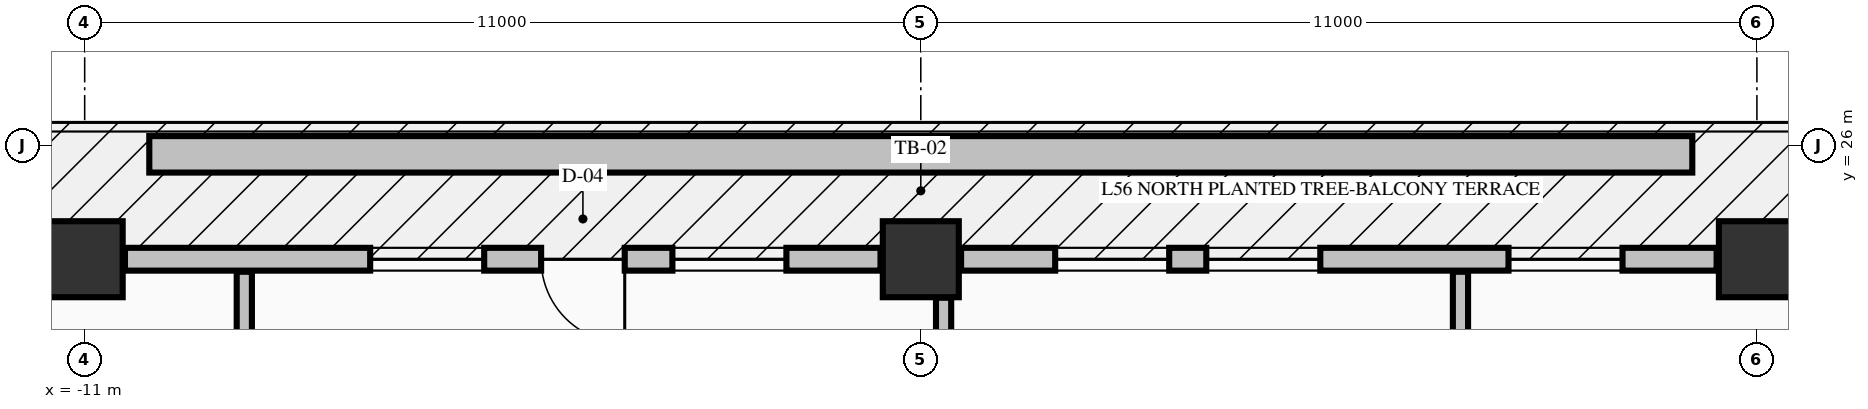
"""IFC4 building model, lengths in metres.
Left out: names, types, materials, properties, quantities, classifications, styles, units other than length and angle.
Written with IfcOpenShell. Run it as: python <this file> out.ifc"""

import sys

from ifc_helpers import new_model, si_unit, direction, frame, frame_2d, origin, origin_2d, place, context, subcontext, project, spatial, rectangle, extrude, element, fill, save


model = new_model("IFC4")
c1 = context("Model", 3, precision=1e-05, world=origin(), true_north=direction((0.0, 1.0)))
c2 = subcontext(c1, "Body", "Model", "MODEL_VIEW")
j1 = project(units=[si_unit("LENGTHUNIT", "METRE"), si_unit("PLANEANGLEUNIT", "RADIAN")], contexts=[c1])
p1 = place(None, origin())
s1 = spatial("IfcSite", under=j1, at=p1, CompositionType="ELEMENT")
p2 = place(p1, origin())
s2 = spatial("IfcBuilding", under=s1, at=p2, CompositionType="ELEMENT")
p3 = place(p2, frame((0.0, 0.0, 215.26)))
s3 = spatial("IfcBuildingStorey", under=s2, at=p3, CompositionType="ELEMENT", Elevation=215.26)
for number, where, z_axis, x_axis in (
    (1, (-11.0, 24.5, -0.25), (0.0, 0.0, 1.0), (1.0, 0.0, 0.0)),
    (2, (0.0, 24.5, -0.25), (0.0, 0.0, 1.0), (1.0, 0.0, 0.0)),
    (3, (11.0, 24.5, -0.25), (0.0, 0.0, 1.0), (1.0, 0.0, 0.0)),
):
    element("IfcColumn", number, at=place(p3, frame(where, z_axis=z_axis, x_axis=x_axis)), inside=s3, PredefinedType="COLUMN", context=c2, shape_type="SweptSolid", body=[
        extrude(rectangle(XDim=1.0, YDim=1.0, at=origin_2d()), origin(), (0.0, 0.0, 1.0), 3.4),
    ])
p4 = place(p3, frame((-0.53, 24.5, 0.0), z_axis=(0.0, 0.0, 1.0), x_axis=(-1.0, 0.0, 0.0)))
e4 = element("IfcWall", 4, at=p4, inside=s3, PredefinedType="STANDARD", context=c2, shape_type="SweptSolid", body=[
    extrude(rectangle(XDim=9.94, YDim=0.3, at=frame_2d((4.97, 0.0))), origin(), (0.0, 0.0, 1.0), 2.542),
])
p5 = place(p4, frame((3.365, 0.0, 0.0)))
e5 = element("IfcOpeningElement", 5, at=p5, cuts=e4, PredefinedType="OPENING", context=c2, shape_type="SweptSolid", body=[
    extrude(rectangle(XDim=1.1, YDim=2.15, at=frame_2d((0.55, 1.075))), frame((0.0, 0.16, 0.0), z_axis=(0.0, -1.0, 0.0), x_axis=(1.0, 0.0, 0.0)), (0.0, 0.0, 1.0), 0.32),
])
p6 = place(p4, frame((1.238, 0.0, 0.72)))
e6 = element("IfcOpeningElement", 6, at=p6, cuts=e4, PredefinedType="OPENING", context=c2, shape_type="SweptSolid", body=[
    extrude(rectangle(XDim=1.5, YDim=1.6, at=frame_2d((0.75, 0.8))), frame((0.0, 0.16, 0.0), z_axis=(0.0, -1.0, 0.0), x_axis=(1.0, 0.0, 0.0)), (0.0, 0.0, 1.0), 0.32),
])
p7 = place(p4, frame((5.214, 0.0, 0.72)))
e7 = element("IfcOpeningElement", 7, at=p7, cuts=e4, PredefinedType="OPENING", context=c2, shape_type="SweptSolid", body=[
    extrude(rectangle(XDim=1.5, YDim=1.6, at=frame_2d((0.75, 0.8))), frame((0.0, 0.16, 0.0), z_axis=(0.0, -1.0, 0.0), x_axis=(1.0, 0.0, 0.0)), (0.0, 0.0, 1.0), 0.32),
])
p8 = place(p3, frame((10.47, 24.5, 0.0), z_axis=(0.0, 0.0, 1.0), x_axis=(-1.0, 0.0, 0.0)))
e8 = element("IfcWall", 8, at=p8, inside=s3, PredefinedType="STANDARD", context=c2, shape_type="SweptSolid", body=[
    extrude(rectangle(XDim=9.94, YDim=0.3, at=frame_2d((4.97, 0.0))), origin(), (0.0, 0.0, 1.0), 2.542),
])
p9 = place(p8, frame((1.238, 0.0, 0.72)))
e9 = element("IfcOpeningElement", 9, at=p9, cuts=e8, PredefinedType="OPENING", context=c2, shape_type="SweptSolid", body=[
    extrude(rectangle(XDim=1.5, YDim=1.6, at=frame_2d((0.75, 0.8))), frame((0.0, 0.16, 0.0), z_axis=(0.0, -1.0, 0.0), x_axis=(1.0, 0.0, 0.0)), (0.0, 0.0, 1.0), 0.32),
])
p10 = place(p8, frame((5.214, 0.0, 0.72)))
e10 = element("IfcOpeningElement", 10, at=p10, cuts=e8, PredefinedType="OPENING", context=c2, shape_type="SweptSolid", body=[
    extrude(rectangle(XDim=1.5, YDim=1.6, at=frame_2d((0.75, 0.8))), frame((0.0, 0.16, 0.0), z_axis=(0.0, -1.0, 0.0), x_axis=(1.0, 0.0, 0.0)), (0.0, 0.0, 1.0), 0.32),
])
p11 = place(p8, frame((7.202, 0.0, 0.72)))
e11 = element("IfcOpeningElement", 11, at=p11, cuts=e8, PredefinedType="OPENING", context=c2, shape_type="SweptSolid", body=[
    extrude(rectangle(XDim=1.5, YDim=1.6, at=frame_2d((0.75, 0.8))), frame((0.0, 0.16, 0.0), z_axis=(0.0, -1.0, 0.0), x_axis=(1.0, 0.0, 0.0)), (0.0, 0.0, 1.0), 0.32),
])
p12 = place(p3, frame((-8.9, 16.278, 0.0), z_axis=(0.0, 0.0, 1.0), x_axis=(0.0, 1.0, 0.0)))
e12 = element("IfcWall", 12, at=p12, inside=s3, PredefinedType="PARTITIONING", context=c2, shape_type="SweptSolid", body=[
    extrude(rectangle(XDim=8.057, YDim=0.2, at=frame_2d((4.028, 0.0))), origin(), (0.0, 0.0, 1.0), 3.15),
])
p13 = place(p3, frame((0.3, 16.278, 0.0), z_axis=(0.0, 0.0, 1.0), x_axis=(0.0, 1.0, 0.0)))
e13 = element("IfcWall", 13, at=p13, inside=s3, PredefinedType="PARTITIONING", context=c2, shape_type="SweptSolid", body=[
    extrude(rectangle(XDim=7.716, YDim=0.2, at=frame_2d((3.858, 0.0))), origin(), (0.0, 0.0, 1.0), 2.342),
])
p14 = place(p3, frame((7.1, 16.278, 0.0), z_axis=(0.0, 0.0, 1.0), x_axis=(0.0, 1.0, 0.0)))
e14 = element("IfcWall", 14, at=p14, inside=s3, PredefinedType="PARTITIONING", context=c2, shape_type="SweptSolid", body=[
    extrude(rectangle(XDim=8.057, YDim=0.2, at=frame_2d((4.028, 0.0))), origin(), (0.0, 0.0, 1.0), 3.15),
])
p15 = place(p3, frame((-10.15, 25.88, -0.04), z_axis=(0.0, 0.0, 1.0), x_axis=(1.0, 0.0, 0.0)))
e15 = element("IfcWall", 15, at=p15, inside=s3, PredefinedType="PARAPET", context=c2, shape_type="SweptSolid", body=[
    extrude(rectangle(XDim=20.3, YDim=0.48, at=frame_2d((10.15, 0.0))), origin(), (0.0, 0.0, 1.0), 0.52),
])
p16 = place(p5, origin())
e16 = element("IfcDoor", 16, at=p16, inside=s3, OperationType="SINGLE_SWING_LEFT", PredefinedType="DOOR", context=c2, shape_type="SweptSolid", body=[
    extrude(rectangle(XDim=1.1, YDim=2.15, at=frame_2d((0.55, 1.075))), frame((0.0, 0.025, 0.0), z_axis=(0.0, -1.0, 0.0), x_axis=(1.0, 0.0, 0.0)), (0.0, 0.0, 1.0), 0.05),
])
fill(e5, e16)
p17 = place(p6, origin())
e17 = element("IfcWindow", 17, at=p17, inside=s3, PartitioningType="SINGLE_PANEL", PredefinedType="WINDOW", context=c2, shape_type="SweptSolid", body=[
    extrude(rectangle(XDim=1.5, YDim=1.6, at=frame_2d((0.75, 0.8))), frame((0.0, 0.03, 0.0), z_axis=(0.0, -1.0, 0.0), x_axis=(1.0, 0.0, 0.0)), (0.0, 0.0, 1.0), 0.06),
])
fill(e6, e17)
p18 = place(p7, origin())
e18 = element("IfcWindow", 18, at=p18, inside=s3, PartitioningType="SINGLE_PANEL", PredefinedType="WINDOW", context=c2, shape_type="SweptSolid", body=[
    extrude(rectangle(XDim=1.5, YDim=1.6, at=frame_2d((0.75, 0.8))), frame((0.0, 0.03, 0.0), z_axis=(0.0, -1.0, 0.0), x_axis=(1.0, 0.0, 0.0)), (0.0, 0.0, 1.0), 0.06),
])
fill(e7, e18)
p19 = place(p9, origin())
e19 = element("IfcWindow", 19, at=p19, inside=s3, PartitioningType="SINGLE_PANEL", PredefinedType="WINDOW", context=c2, shape_type="SweptSolid", body=[
    extrude(rectangle(XDim=1.5, YDim=1.6, at=frame_2d((0.75, 0.8))), frame((0.0, 0.03, 0.0), z_axis=(0.0, -1.0, 0.0), x_axis=(1.0, 0.0, 0.0)), (0.0, 0.0, 1.0), 0.06),
])
fill(e9, e19)
p20 = place(p10, origin())
e20 = element("IfcWindow", 20, at=p20, inside=s3, PartitioningType="SINGLE_PANEL", PredefinedType="WINDOW", context=c2, shape_type="SweptSolid", body=[
    extrude(rectangle(XDim=1.5, YDim=1.6, at=frame_2d((0.75, 0.8))), frame((0.0, 0.03, 0.0), z_axis=(0.0, -1.0, 0.0), x_axis=(1.0, 0.0, 0.0)), (0.0, 0.0, 1.0), 0.06),
])
fill(e10, e20)
p21 = place(p11, origin())
e21 = element("IfcWindow", 21, at=p21, inside=s3, PartitioningType="SINGLE_PANEL", PredefinedType="WINDOW", context=c2, shape_type="SweptSolid", body=[
    extrude(rectangle(XDim=1.5, YDim=1.6, at=frame_2d((0.75, 0.8))), frame((0.0, 0.03, 0.0), z_axis=(0.0, -1.0, 0.0), x_axis=(1.0, 0.0, 0.0)), (0.0, 0.0, 1.0), 0.06),
])
fill(e11, e21)
save(model, sys.argv[1])
